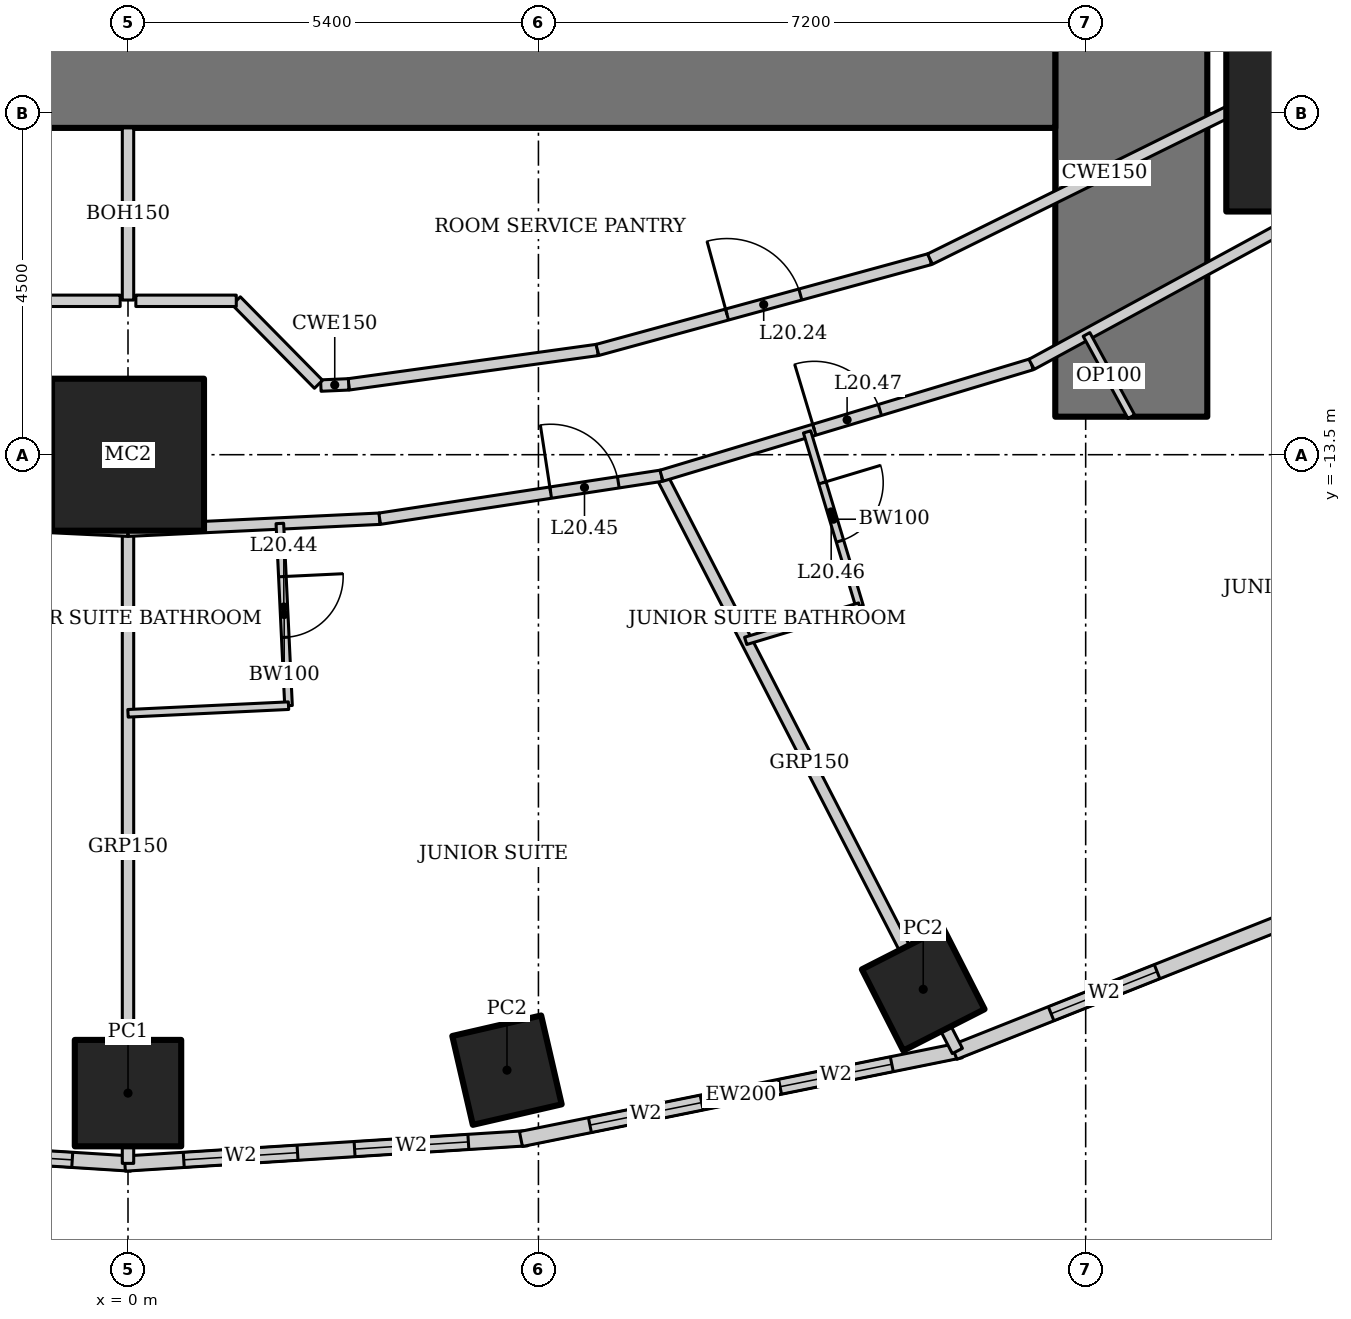
"""IFC4 building model, lengths in metres.
Left out: names, types, materials, properties, quantities, classifications, styles, units other than length and angle.
Written with IfcOpenShell. Run it as: python <this file> out.ifc"""

import sys

from ifc_helpers import new_model, si_unit, direction, frame, frame_2d, origin, origin_2d, place, context, subcontext, project, spatial, rectangle, hollow_rectangle, extrude, element, fill, save


model = new_model("IFC4")
c1 = context("Model", 3, precision=1e-05, world=origin(), true_north=direction((0.0, 1.0)))
c2 = subcontext(c1, "Body", "Model", "MODEL_VIEW")
j1 = project(units=[si_unit("LENGTHUNIT", "METRE"), si_unit("PLANEANGLEUNIT", "RADIAN")], contexts=[c1])
p1 = place(None, origin())
s1 = spatial("IfcSite", under=j1, at=p1, CompositionType="ELEMENT")
p2 = place(p1, origin())
s2 = spatial("IfcBuilding", under=s1, at=p2, CompositionType="ELEMENT")
p3 = place(p2, frame((0.0, 0.0, 87.4)))
s3 = spatial("IfcBuildingStorey", under=s2, at=p3, CompositionType="ELEMENT", Elevation=87.4)
p4 = place(p3, frame((0.0, -13.5, 0.0), z_axis=(0.0, 0.0, 1.0), x_axis=(1.0, 0.0, 0.0)))
e1 = element("IfcColumn", 1, at=p4, inside=s3, PredefinedType="COLUMN", context=c2, shape_type="SweptSolid", body=[
    extrude(hollow_rectangle(XDim=2.0, YDim=2.0, WallThickness=0.17, at=origin_2d()), origin(), (0.0, 0.0, 1.0), 3.6),
])
p5 = place(p3, frame((15.75, -9.0, 0.0), z_axis=(0.0, 0.0, 1.0), x_axis=(1.0, 0.0, 0.0)))
e2 = element("IfcColumn", 2, at=p5, inside=s3, PredefinedType="COLUMN", context=c2, shape_type="SweptSolid", body=[
    extrude(hollow_rectangle(XDim=2.6, YDim=2.6, WallThickness=0.13, at=origin_2d()), origin(), (0.0, 0.0, 1.0), 3.6),
])
p6 = place(p3, frame((0.0, -21.9, 0.0), z_axis=(0.0, 0.0, 1.0), x_axis=(1.0, 0.0, 0.0)))
e3 = element("IfcColumn", 3, at=p6, inside=s3, PredefinedType="COLUMN", context=c2, shape_type="SweptSolid", body=[
    extrude(hollow_rectangle(XDim=1.4, YDim=1.4, WallThickness=0.1, at=origin_2d()), origin(), (0.0, 0.0, 1.0), 3.6),
])
for number, where, z_axis, x_axis in (
    (4, (4.986, -21.598, 0.0), (0.0, 0.0, 1.0), (0.974, 0.225, 0.0)),
    (5, (10.463, -20.534, 0.0), (0.0, 0.0, 1.0), (0.891, 0.454, 0.0)),
):
    element("IfcColumn", number, at=place(p3, frame(where, z_axis=z_axis, x_axis=x_axis)), inside=s3, PredefinedType="COLUMN", context=c2, shape_type="SweptSolid", body=[
        extrude(hollow_rectangle(XDim=1.2, YDim=1.2, WallThickness=0.1, at=origin_2d()), origin(), (0.0, 0.0, 1.0), 3.6),
    ])
p7 = place(p3, frame((13.2, -13.0, 0.0), z_axis=(0.0, 0.0, 1.0), x_axis=(0.0, 1.0, 0.0)))
e6 = element("IfcWall", 6, at=p7, inside=s3, PredefinedType="SHEAR", context=c2, shape_type="SweptSolid", body=[
    extrude(rectangle(XDim=26.0, YDim=2.0, at=frame_2d((13.0, 0.0))), origin(), (0.0, 0.0, 1.0), 3.6),
])
p8 = place(p7, frame((12.1, 0.0, 0.0)))
e7 = element("IfcOpeningElement", 7, at=p8, cuts=e6, PredefinedType="OPENING", context=c2, shape_type="SweptSolid", body=[
    extrude(rectangle(XDim=1.8, YDim=2.1, at=frame_2d((0.9, 1.05))), frame((0.0, 1.01, 0.0), z_axis=(0.0, -1.0, 0.0), x_axis=(1.0, 0.0, 0.0)), (0.0, 0.0, 1.0), 2.02),
])
p9 = place(p3, frame((-12.2, -8.0, 0.0), z_axis=(0.0, 0.0, 1.0), x_axis=(1.0, 0.0, 0.0)))
e8 = element("IfcWall", 8, at=p9, inside=s3, PredefinedType="SHEAR", context=c2, shape_type="SweptSolid", body=[
    extrude(rectangle(XDim=24.4, YDim=2.4, at=frame_2d((12.2, 0.0))), origin(), (0.0, 0.0, 1.0), 3.6),
])
p10 = place(p3, frame((-5.253, -22.493, 0.0), z_axis=(0.0, 0.0, 1.0), x_axis=(0.998018582375, -0.062919863585, 0.0)))
e9 = element("IfcWall", 9, at=p10, inside=s3, PredefinedType="SOLIDWALL", context=c2, shape_type="SweptSolid", body=[
    extrude(rectangle(XDim=5.304, YDim=0.2, at=frame_2d((2.652, 0.0))), origin(), (0.0, 0.0, 1.0), 3.45),
])
p11 = place(p10, frame((0.776, 0.0, 0.5)))
e10 = element("IfcOpeningElement", 10, at=p11, cuts=e9, PredefinedType="OPENING", context=c2, shape_type="SweptSolid", body=[
    extrude(rectangle(XDim=1.5, YDim=2.2, at=frame_2d((0.75, 1.1))), frame((0.0, 0.11, 0.0), z_axis=(0.0, -1.0, 0.0), x_axis=(1.0, 0.0, 0.0)), (0.0, 0.0, 1.0), 0.22),
])
p12 = place(p10, frame((3.028, 0.0, 0.5)))
e11 = element("IfcOpeningElement", 11, at=p12, cuts=e9, PredefinedType="OPENING", context=c2, shape_type="SweptSolid", body=[
    extrude(rectangle(XDim=1.5, YDim=2.2, at=frame_2d((0.75, 1.1))), frame((0.0, 0.11, 0.0), z_axis=(0.0, -1.0, 0.0), x_axis=(1.0, 0.0, 0.0)), (0.0, 0.0, 1.0), 0.22),
])
p13 = place(p3, frame((-0.041, -22.827, 0.0), z_axis=(0.0, 0.0, 1.0), x_axis=(0.998018582375, 0.062919863585, 0.0)))
e12 = element("IfcWall", 12, at=p13, inside=s3, PredefinedType="SOLIDWALL", context=c2, shape_type="SweptSolid", body=[
    extrude(rectangle(XDim=5.304, YDim=0.2, at=frame_2d((2.652, 0.0))), origin(), (0.0, 0.0, 1.0), 3.45),
])
p14 = place(p13, frame((0.776, 0.0, 0.5)))
e13 = element("IfcOpeningElement", 13, at=p14, cuts=e12, PredefinedType="OPENING", context=c2, shape_type="SweptSolid", body=[
    extrude(rectangle(XDim=1.5, YDim=2.2, at=frame_2d((0.75, 1.1))), frame((0.0, 0.11, 0.0), z_axis=(0.0, -1.0, 0.0), x_axis=(1.0, 0.0, 0.0)), (0.0, 0.0, 1.0), 0.22),
])
p15 = place(p13, frame((3.028, 0.0, 0.5)))
e14 = element("IfcOpeningElement", 14, at=p15, cuts=e12, PredefinedType="OPENING", context=c2, shape_type="SweptSolid", body=[
    extrude(rectangle(XDim=1.5, YDim=2.2, at=frame_2d((0.75, 1.1))), frame((0.0, 0.11, 0.0), z_axis=(0.0, -1.0, 0.0), x_axis=(1.0, 0.0, 0.0)), (0.0, 0.0, 1.0), 0.22),
])
p16 = place(p3, frame((5.17, -22.504, 0.0), z_axis=(0.0, 0.0, 1.0), x_axis=(0.980251657452, 0.197754110105, 0.0)))
e15 = element("IfcWall", 15, at=p16, inside=s3, PredefinedType="SOLIDWALL", context=c2, shape_type="SweptSolid", body=[
    extrude(rectangle(XDim=5.904, YDim=0.2, at=frame_2d((2.952, 0.0))), origin(), (0.0, 0.0, 1.0), 3.45),
])
p17 = place(p16, frame((0.926, 0.0, 0.5)))
e16 = element("IfcOpeningElement", 16, at=p17, cuts=e15, PredefinedType="OPENING", context=c2, shape_type="SweptSolid", body=[
    extrude(rectangle(XDim=1.5, YDim=2.2, at=frame_2d((0.75, 1.1))), frame((0.0, 0.11, 0.0), z_axis=(0.0, -1.0, 0.0), x_axis=(1.0, 0.0, 0.0)), (0.0, 0.0, 1.0), 0.22),
])
p18 = place(p16, frame((3.478, 0.0, 0.5)))
e17 = element("IfcOpeningElement", 17, at=p18, cuts=e15, PredefinedType="OPENING", context=c2, shape_type="SweptSolid", body=[
    extrude(rectangle(XDim=1.5, YDim=2.2, at=frame_2d((0.75, 1.1))), frame((0.0, 0.11, 0.0), z_axis=(0.0, -1.0, 0.0), x_axis=(1.0, 0.0, 0.0)), (0.0, 0.0, 1.0), 0.22),
])
p19 = place(p3, frame((10.869, -21.363, 0.0), z_axis=(0.0, 0.0, 1.0), x_axis=(0.929358351251, 0.369178892895, 0.0)))
e18 = element("IfcWall", 18, at=p19, inside=s3, PredefinedType="SOLIDWALL", context=c2, shape_type="SweptSolid", body=[
    extrude(rectangle(XDim=7.692, YDim=0.2, at=frame_2d((3.846, 0.0))), origin(), (0.0, 0.0, 1.0), 3.45),
])
p20 = place(p19, frame((1.373, 0.0, 0.5)))
e19 = element("IfcOpeningElement", 19, at=p20, cuts=e18, PredefinedType="OPENING", context=c2, shape_type="SweptSolid", body=[
    extrude(rectangle(XDim=1.5, YDim=2.2, at=frame_2d((0.75, 1.1))), frame((0.0, 0.11, 0.0), z_axis=(0.0, -1.0, 0.0), x_axis=(1.0, 0.0, 0.0)), (0.0, 0.0, 1.0), 0.22),
])
p21 = place(p19, frame((4.819, 0.0, 0.5)))
e20 = element("IfcOpeningElement", 20, at=p21, cuts=e18, PredefinedType="OPENING", context=c2, shape_type="SweptSolid", body=[
    extrude(rectangle(XDim=1.5, YDim=2.2, at=frame_2d((0.75, 1.1))), frame((0.0, 0.11, 0.0), z_axis=(0.0, -1.0, 0.0), x_axis=(1.0, 0.0, 0.0)), (0.0, 0.0, 1.0), 0.22),
])
p22 = place(p3, frame((0.0, -22.825, 0.0), z_axis=(0.0, 0.0, 1.0), x_axis=(0.0, 1.0, 0.0)))
e21 = element("IfcWall", 21, at=p22, inside=s3, PredefinedType="PARTITIONING", context=c2, shape_type="SweptSolid", body=[
    extrude(rectangle(XDim=8.325, YDim=0.15, at=frame_2d((4.162, 0.0))), origin(), (0.0, 0.0, 1.0), 2.924),
])
p23 = place(p3, frame((10.912, -21.346, 0.0), z_axis=(0.0, 0.0, 1.0), x_axis=(-0.457327273085, 0.889298468059, 0.0)))
e22 = element("IfcWall", 22, at=p23, inside=s3, PredefinedType="PARTITIONING", context=c2, shape_type="SweptSolid", body=[
    extrude(rectangle(XDim=8.511, YDim=0.15, at=frame_2d((4.256, 0.0))), origin(), (0.0, 0.0, 1.0), 2.528),
])
p24 = place(p3, frame((-3.311, -14.342, 0.0), z_axis=(0.0, 0.0, 1.0), x_axis=(0.998863968075, -0.047652631422, 0.0)))
e23 = element("IfcWall", 23, at=p24, inside=s3, PredefinedType="PARTITIONING", context=c2, shape_type="SweptSolid", body=[
    extrude(rectangle(XDim=3.315, YDim=0.15, at=frame_2d((1.657, 0.0))), origin(), (0.0, 0.0, 1.0), 3.45),
])
p25 = place(p24, frame((0.15, 0.0, 0.0)))
e24 = element("IfcOpeningElement", 24, at=p25, cuts=e23, PredefinedType="OPENING", context=c2, shape_type="SweptSolid", body=[
    extrude(rectangle(XDim=0.9, YDim=2.1, at=frame_2d((0.45, 1.05))), frame((0.0, 0.085, 0.0), z_axis=(0.0, -1.0, 0.0), x_axis=(1.0, 0.0, 0.0)), (0.0, 0.0, 1.0), 0.17),
])
p26 = place(p3, frame((0.0, -14.5, 0.0), z_axis=(0.0, 0.0, 1.0), x_axis=(0.998863968075, 0.047652631422, 0.0)))
e25 = element("IfcWall", 25, at=p26, inside=s3, PredefinedType="PARTITIONING", context=c2, shape_type="SweptSolid", body=[
    extrude(rectangle(XDim=3.315, YDim=0.15, at=frame_2d((1.657, 0.0))), origin(), (0.0, 0.0, 1.0), 3.45),
])
p27 = place(p3, frame((3.311, -14.342, 0.0), z_axis=(0.0, 0.0, 1.0), x_axis=(0.988564270062, 0.150800145746, 0.0)))
e26 = element("IfcWall", 26, at=p27, inside=s3, PredefinedType="PARTITIONING", context=c2, shape_type="SweptSolid", body=[
    extrude(rectangle(XDim=3.751, YDim=0.15, at=frame_2d((1.875, 0.0))), origin(), (0.0, 0.0, 1.0), 3.45),
])
p28 = place(p27, frame((2.276, 0.0, 0.0)))
e27 = element("IfcOpeningElement", 27, at=p28, cuts=e26, PredefinedType="OPENING", context=c2, shape_type="SweptSolid", body=[
    extrude(rectangle(XDim=0.9, YDim=2.1, at=frame_2d((0.45, 1.05))), frame((0.0, 0.085, 0.0), z_axis=(0.0, -1.0, 0.0), x_axis=(1.0, 0.0, 0.0)), (0.0, 0.0, 1.0), 0.17),
])
p29 = place(p3, frame((7.019, -13.776, 0.0), z_axis=(0.0, 0.0, 1.0), x_axis=(0.957564241242, 0.288219922793, 0.0)))
e28 = element("IfcWall", 28, at=p29, inside=s3, PredefinedType="PARTITIONING", context=c2, shape_type="SweptSolid", body=[
    extrude(rectangle(XDim=5.085, YDim=0.15, at=frame_2d((2.542, 0.0))), origin(), (0.0, 0.0, 1.0), 3.45),
])
p30 = place(p29, frame((2.1, 0.0, 0.0)))
e29 = element("IfcOpeningElement", 29, at=p30, cuts=e28, PredefinedType="OPENING", context=c2, shape_type="SweptSolid", body=[
    extrude(rectangle(XDim=0.9, YDim=2.1, at=frame_2d((0.45, 1.05))), frame((0.0, 0.085, 0.0), z_axis=(0.0, -1.0, 0.0), x_axis=(1.0, 0.0, 0.0)), (0.0, 0.0, 1.0), 0.17),
])
p31 = place(p3, frame((11.888, -12.311, 0.0), z_axis=(0.0, 0.0, 1.0), x_axis=(0.878450059298, 0.477834169267, 0.0)))
e30 = element("IfcWall", 30, at=p31, inside=s3, PredefinedType="PARTITIONING", context=c2, shape_type="SweptSolid", body=[
    extrude(rectangle(XDim=5.631, YDim=0.15, at=frame_2d((2.815, 0.0))), origin(), (0.0, 0.0, 1.0), 3.45),
])
p32 = place(p3, frame((2.903, -12.574, 0.0), z_axis=(0.0, 0.0, 1.0), x_axis=(0.990563451353, 0.137054911782, 0.0)))
e31 = element("IfcWall", 31, at=p32, inside=s3, PredefinedType="PARTITIONING", context=c2, shape_type="SweptSolid", body=[
    extrude(rectangle(XDim=3.304, YDim=0.15, at=frame_2d((1.652, 0.0))), origin(), (0.0, 0.0, 1.0), 3.45),
])
p33 = place(p3, frame((6.176, -12.122, 0.0), z_axis=(0.0, 0.0, 1.0), x_axis=(0.964644466646, 0.263554648923, 0.0)))
e32 = element("IfcWall", 32, at=p33, inside=s3, PredefinedType="PARTITIONING", context=c2, shape_type="SweptSolid", body=[
    extrude(rectangle(XDim=4.535, YDim=0.15, at=frame_2d((2.268, 0.0))), origin(), (0.0, 0.0, 1.0), 3.45),
])
p34 = place(p33, frame((1.768, 0.0, 0.0)))
e33 = element("IfcOpeningElement", 33, at=p34, cuts=e32, PredefinedType="OPENING", context=c2, shape_type="SweptSolid", body=[
    extrude(rectangle(XDim=1.0, YDim=2.1, at=frame_2d((0.5, 1.05))), frame((0.0, 0.085, 0.0), z_axis=(0.0, -1.0, 0.0), x_axis=(1.0, 0.0, 0.0)), (0.0, 0.0, 1.0), 0.17),
])
p35 = place(p3, frame((10.551, -10.926, 0.0), z_axis=(0.0, 0.0, 1.0), x_axis=(0.89656943448, 0.442903205177, 0.0)))
e34 = element("IfcWall", 34, at=p35, inside=s3, PredefinedType="PARTITIONING", context=c2, shape_type="SweptSolid", body=[
    extrude(rectangle(XDim=5.126, YDim=0.15, at=frame_2d((2.563, 0.0))), origin(), (0.0, 0.0, 1.0), 3.45),
])
p36 = place(p3, frame((1.998, -14.405, 0.0), z_axis=(0.0, 0.0, 1.0), x_axis=(0.047608648396, -0.998866065395, 0.0)))
e35 = element("IfcWall", 35, at=p36, inside=s3, PredefinedType="PARTITIONING", context=c2, shape_type="SweptSolid", body=[
    extrude(rectangle(XDim=2.4, YDim=0.1, at=frame_2d((1.2, 0.0))), origin(), (0.0, 0.0, 1.0), 2.749),
])
p37 = place(p36, frame((0.7, 0.0, 0.0)))
e36 = element("IfcOpeningElement", 36, at=p37, cuts=e35, PredefinedType="OPENING", context=c2, shape_type="SweptSolid", body=[
    extrude(rectangle(XDim=0.8, YDim=2.1, at=frame_2d((0.4, 1.05))), frame((0.0, 0.06, 0.0), z_axis=(0.0, -1.0, 0.0), x_axis=(1.0, 0.0, 0.0)), (0.0, 0.0, 1.0), 0.12),
])
p38 = place(p3, frame((2.112, -16.802, 0.0), z_axis=(0.0, 0.0, 1.0), x_axis=(-0.998862383453, -0.047685835668, 0.0)))
e37 = element("IfcWall", 37, at=p38, inside=s3, PredefinedType="PARTITIONING", context=c2, shape_type="SweptSolid", body=[
    extrude(rectangle(XDim=2.115, YDim=0.1, at=frame_2d((1.057, 0.0))), origin(), (0.0, 0.0, 1.0), 3.45),
])
p39 = place(p3, frame((8.935, -13.2, 0.0), z_axis=(0.0, 0.0, 1.0), x_axis=(0.288197066254, -0.957571120598, 0.0)))
e38 = element("IfcWall", 38, at=p39, inside=s3, PredefinedType="PARTITIONING", context=c2, shape_type="SweptSolid", body=[
    extrude(rectangle(XDim=2.4, YDim=0.1, at=frame_2d((1.2, 0.0))), origin(), (0.0, 0.0, 1.0), 3.45),
])
p40 = place(p39, frame((0.7, 0.0, 0.0)))
e39 = element("IfcOpeningElement", 39, at=p40, cuts=e38, PredefinedType="OPENING", context=c2, shape_type="SweptSolid", body=[
    extrude(rectangle(XDim=0.8, YDim=2.1, at=frame_2d((0.4, 1.05))), frame((0.0, 0.06, 0.0), z_axis=(0.0, -1.0, 0.0), x_axis=(1.0, 0.0, 0.0)), (0.0, 0.0, 1.0), 0.12),
])
p41 = place(p3, frame((9.626, -15.498, 0.0), z_axis=(0.0, 0.0, 1.0), x_axis=(-0.957551231109, -0.288263143328, 0.0)))
e40 = element("IfcWall", 40, at=p41, inside=s3, PredefinedType="PARTITIONING", context=c2, shape_type="SweptSolid", body=[
    extrude(rectangle(XDim=1.566, YDim=0.1, at=frame_2d((0.783, 0.0))), origin(), (0.0, 0.0, 1.0), 3.45),
])
p42 = place(p3, frame((13.2, -13.0, 0.0), z_axis=(0.0, 0.0, 1.0), x_axis=(-0.477852414256, 0.878440134665, 0.0)))
e41 = element("IfcWall", 41, at=p42, inside=s3, PredefinedType="PARTITIONING", context=c2, shape_type="SweptSolid", body=[
    extrude(rectangle(XDim=1.232, YDim=0.1, at=frame_2d((0.616, 0.0))), origin(), (0.0, 0.0, 1.0), 3.45),
])
p43 = place(p3, frame((2.537, -12.59, 0.0), z_axis=(0.0, 0.0, 1.0), x_axis=(0.999061181733, 0.04332153223, 0.0)))
e42 = element("IfcWall", 42, at=p43, inside=s3, PredefinedType="PARTITIONING", context=c2, shape_type="SweptSolid", body=[
    extrude(rectangle(XDim=0.366, YDim=0.15, at=frame_2d((0.183, 0.0))), origin(), (0.0, 0.0, 1.0), 3.45),
])
p44 = place(p3, frame((0.0, -9.2, 0.0), z_axis=(0.0, 0.0, 1.0), x_axis=(0.0, -1.0, 0.0)))
e43 = element("IfcWall", 43, at=p44, inside=s3, PredefinedType="PARTITIONING", context=c2, shape_type="SweptSolid", body=[
    extrude(rectangle(XDim=2.265, YDim=0.15, at=frame_2d((1.133, 0.0))), origin(), (0.0, 0.0, 1.0), 3.044),
])
p45 = place(p3, frame((-1.425, -11.475, 0.0), z_axis=(0.0, 0.0, 1.0), x_axis=(1.0, 0.0, 0.0)))
e44 = element("IfcWall", 44, at=p45, inside=s3, PredefinedType="PARTITIONING", context=c2, shape_type="SweptSolid", body=[
    extrude(rectangle(XDim=1.321, YDim=0.15, at=frame_2d((0.661, 0.0))), origin(), (0.0, 0.0, 1.0), 3.45),
])
p46 = place(p3, frame((1.425, -11.475, 0.0), z_axis=(0.0, 0.0, 1.0), x_axis=(0.701622806479, -0.712548550927, 0.0)))
e45 = element("IfcWall", 45, at=p46, inside=s3, PredefinedType="PARTITIONING", context=c2, shape_type="SweptSolid", body=[
    extrude(rectangle(XDim=1.542, YDim=0.15, at=frame_2d((0.771, 0.0))), origin(), (0.0, 0.0, 1.0), 3.45),
])
p47 = place(p3, frame((0.103, -11.475, 0.0), z_axis=(0.0, 0.0, 1.0), x_axis=(1.0, 0.0, 0.0)))
e46 = element("IfcWall", 46, at=p47, inside=s3, PredefinedType="PARTITIONING", context=c2, shape_type="SweptSolid", body=[
    extrude(rectangle(XDim=1.321, YDim=0.15, at=frame_2d((0.661, 0.0))), origin(), (0.0, 0.0, 1.0), 3.45),
])
p48 = place(p12, origin())
e47 = element("IfcWindow", 47, at=p48, inside=s3, PartitioningType="SINGLE_PANEL", PredefinedType="WINDOW", context=c2, shape_type="SweptSolid", body=[
    extrude(rectangle(XDim=1.5, YDim=2.2, at=frame_2d((0.75, 1.1))), frame((0.0, 0.03, 0.0), z_axis=(0.0, -1.0, 0.0), x_axis=(1.0, 0.0, 0.0)), (0.0, 0.0, 1.0), 0.06),
])
fill(e11, e47)
p49 = place(p14, origin())
e48 = element("IfcWindow", 48, at=p49, inside=s3, PartitioningType="SINGLE_PANEL", PredefinedType="WINDOW", context=c2, shape_type="SweptSolid", body=[
    extrude(rectangle(XDim=1.5, YDim=2.2, at=frame_2d((0.75, 1.1))), frame((0.0, 0.03, 0.0), z_axis=(0.0, -1.0, 0.0), x_axis=(1.0, 0.0, 0.0)), (0.0, 0.0, 1.0), 0.06),
])
fill(e13, e48)
p50 = place(p15, origin())
e49 = element("IfcWindow", 49, at=p50, inside=s3, PartitioningType="SINGLE_PANEL", PredefinedType="WINDOW", context=c2, shape_type="SweptSolid", body=[
    extrude(rectangle(XDim=1.5, YDim=2.2, at=frame_2d((0.75, 1.1))), frame((0.0, 0.03, 0.0), z_axis=(0.0, -1.0, 0.0), x_axis=(1.0, 0.0, 0.0)), (0.0, 0.0, 1.0), 0.06),
])
fill(e14, e49)
p51 = place(p17, origin())
e50 = element("IfcWindow", 50, at=p51, inside=s3, PartitioningType="SINGLE_PANEL", PredefinedType="WINDOW", context=c2, shape_type="SweptSolid", body=[
    extrude(rectangle(XDim=1.5, YDim=2.2, at=frame_2d((0.75, 1.1))), frame((0.0, 0.03, 0.0), z_axis=(0.0, -1.0, 0.0), x_axis=(1.0, 0.0, 0.0)), (0.0, 0.0, 1.0), 0.06),
])
fill(e16, e50)
p52 = place(p18, origin())
e51 = element("IfcWindow", 51, at=p52, inside=s3, PartitioningType="SINGLE_PANEL", PredefinedType="WINDOW", context=c2, shape_type="SweptSolid", body=[
    extrude(rectangle(XDim=1.5, YDim=2.2, at=frame_2d((0.75, 1.1))), frame((0.0, 0.03, 0.0), z_axis=(0.0, -1.0, 0.0), x_axis=(1.0, 0.0, 0.0)), (0.0, 0.0, 1.0), 0.06),
])
fill(e17, e51)
p53 = place(p20, origin())
e52 = element("IfcWindow", 52, at=p53, inside=s3, PartitioningType="SINGLE_PANEL", PredefinedType="WINDOW", context=c2, shape_type="SweptSolid", body=[
    extrude(rectangle(XDim=1.5, YDim=2.2, at=frame_2d((0.75, 1.1))), frame((0.0, 0.03, 0.0), z_axis=(0.0, -1.0, 0.0), x_axis=(1.0, 0.0, 0.0)), (0.0, 0.0, 1.0), 0.06),
])
fill(e19, e52)
p54 = place(p34, origin())
e53 = element("IfcDoor", 53, at=p54, inside=s3, OperationType="SINGLE_SWING_LEFT", PredefinedType="DOOR", context=c2, shape_type="SweptSolid", body=[
    extrude(rectangle(XDim=1.0, YDim=2.1, at=frame_2d((0.5, 1.05))), frame((0.0, 0.025, 0.0), z_axis=(0.0, -1.0, 0.0), x_axis=(1.0, 0.0, 0.0)), (0.0, 0.0, 1.0), 0.05),
])
fill(e33, e53)
p55 = place(p37, origin())
e54 = element("IfcDoor", 54, at=p55, inside=s3, OperationType="SINGLE_SWING_LEFT", PredefinedType="DOOR", context=c2, shape_type="SweptSolid", body=[
    extrude(rectangle(XDim=0.8, YDim=2.1, at=frame_2d((0.4, 1.05))), frame((0.0, 0.025, 0.0), z_axis=(0.0, -1.0, 0.0), x_axis=(1.0, 0.0, 0.0)), (0.0, 0.0, 1.0), 0.05),
])
fill(e36, e54)
p56 = place(p28, origin())
e55 = element("IfcDoor", 55, at=p56, inside=s3, OperationType="SINGLE_SWING_LEFT", PredefinedType="DOOR", context=c2, shape_type="SweptSolid", body=[
    extrude(rectangle(XDim=0.9, YDim=2.1, at=frame_2d((0.45, 1.05))), frame((0.0, 0.025, 0.0), z_axis=(0.0, -1.0, 0.0), x_axis=(1.0, 0.0, 0.0)), (0.0, 0.0, 1.0), 0.05),
])
fill(e27, e55)
p57 = place(p40, origin())
e56 = element("IfcDoor", 56, at=p57, inside=s3, OperationType="SINGLE_SWING_LEFT", PredefinedType="DOOR", context=c2, shape_type="SweptSolid", body=[
    extrude(rectangle(XDim=0.8, YDim=2.1, at=frame_2d((0.4, 1.05))), frame((0.0, 0.025, 0.0), z_axis=(0.0, -1.0, 0.0), x_axis=(1.0, 0.0, 0.0)), (0.0, 0.0, 1.0), 0.05),
])
fill(e39, e56)
p58 = place(p30, origin())
e57 = element("IfcDoor", 57, at=p58, inside=s3, OperationType="SINGLE_SWING_LEFT", PredefinedType="DOOR", context=c2, shape_type="SweptSolid", body=[
    extrude(rectangle(XDim=0.9, YDim=2.1, at=frame_2d((0.45, 1.05))), frame((0.0, 0.025, 0.0), z_axis=(0.0, -1.0, 0.0), x_axis=(1.0, 0.0, 0.0)), (0.0, 0.0, 1.0), 0.05),
])
fill(e29, e57)
save(model, sys.argv[1])
